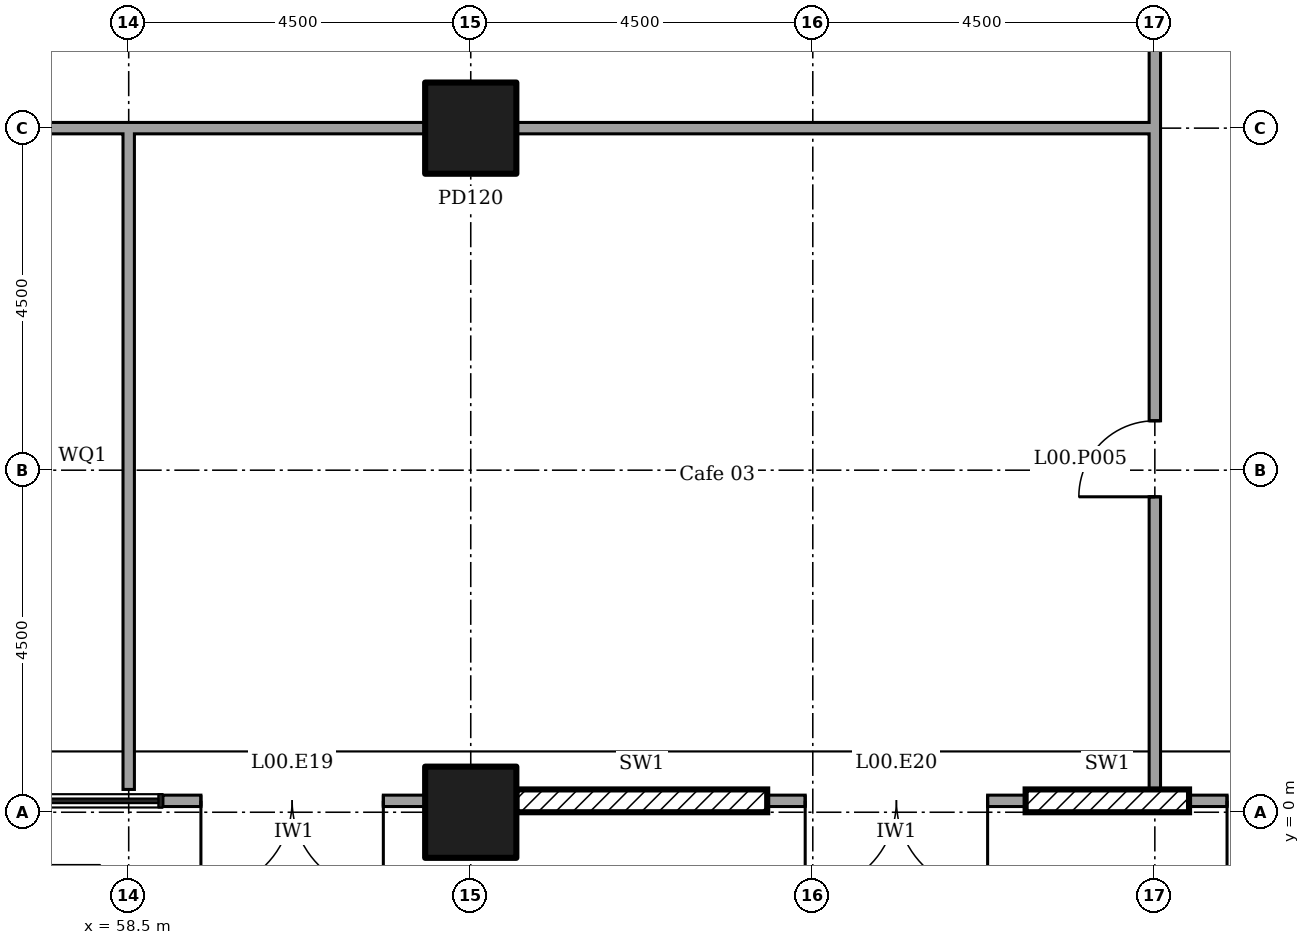
"""IFC4 building model, lengths in metres.
Left out: names, types, materials, properties, quantities, classifications, styles, units other than length and angle.
Written with IfcOpenShell. Run it as: python <this file> out.ifc"""

import sys

from ifc_helpers import new_model, si_unit, direction, frame, frame_2d, origin, origin_2d, place, context, subcontext, project, spatial, rectangle, extrude, element, fill, save


model = new_model("IFC4")
c1 = context("Model", 3, precision=1e-05, world=origin(), true_north=direction((0.0, 1.0)))
c2 = subcontext(c1, "Body", "Model", "MODEL_VIEW")
j1 = project(units=[si_unit("LENGTHUNIT", "METRE"), si_unit("PLANEANGLEUNIT", "RADIAN")], contexts=[c1])
p1 = place(None, origin())
s1 = spatial("IfcSite", under=j1, at=p1, CompositionType="ELEMENT")
p2 = place(p1, origin())
s2 = spatial("IfcBuilding", under=s1, at=p2, CompositionType="ELEMENT")
p3 = place(p2, origin())
s3 = spatial("IfcBuildingStorey", under=s2, at=p3, CompositionType="ELEMENT", Elevation=0.0)
for number, where in (
    (1, (63.0, 0.0, 0.0)),
    (2, (63.0, 9.0, 0.0)),
):
    element("IfcColumn", number, at=place(p3, frame(where)), inside=s3, PredefinedType="COLUMN", context=c2, shape_type="SweptSolid", body=[
        extrude(rectangle(XDim=1.2, YDim=1.2, at=origin_2d()), origin(), (0.0, 0.0, 1.0), 6.0),
    ])
p4 = place(p3, frame((58.95, 0.15, 0.0)))
e3 = element("IfcWall", 3, at=p4, inside=s3, PredefinedType="SOLIDWALL", context=c2, shape_type="SweptSolid", body=[
    extrude(rectangle(XDim=3.45, YDim=0.15, at=frame_2d((1.725, 0.0))), origin(), (0.0, 0.0, 1.0), 5.55),
])
p5 = place(p4, frame((0.5, 0.0, 0.0)))
e4 = element("IfcOpeningElement", 4, at=p5, cuts=e3, PredefinedType="OPENING", context=c2, shape_type="SweptSolid", body=[
    extrude(rectangle(XDim=2.4, YDim=2.7, at=frame_2d((1.2, 1.35))), frame((0.0, 0.085, 0.0), z_axis=(0.0, -1.0, 0.0), x_axis=(1.0, 0.0, 0.0)), (0.0, 0.0, 1.0), 0.17),
])
p6 = place(p3, frame((63.6, 0.15, 0.0)))
e5 = element("IfcWall", 5, at=p6, inside=s3, PredefinedType="ELEMENTEDWALL", context=c2, shape_type="SweptSolid", body=[
    extrude(rectangle(XDim=3.3, YDim=0.3, at=frame_2d((1.65, 0.0))), origin(), (0.0, 0.0, 1.0), 5.55),
])
p7 = place(p3, frame((66.9, 0.15, 0.0)))
e6 = element("IfcWall", 6, at=p7, inside=s3, PredefinedType="SOLIDWALL", context=c2, shape_type="SweptSolid", body=[
    extrude(rectangle(XDim=3.4, YDim=0.15, at=frame_2d((1.7, 0.0))), origin(), (0.0, 0.0, 1.0), 5.55),
])
p8 = place(p7, frame((0.5, 0.0, 0.0)))
e7 = element("IfcOpeningElement", 7, at=p8, cuts=e6, PredefinedType="OPENING", context=c2, shape_type="SweptSolid", body=[
    extrude(rectangle(XDim=2.4, YDim=2.7, at=frame_2d((1.2, 1.35))), frame((0.0, 0.085, 0.0), z_axis=(0.0, -1.0, 0.0), x_axis=(1.0, 0.0, 0.0)), (0.0, 0.0, 1.0), 0.17),
])
p9 = place(p3, frame((70.3, 0.15, 0.0)))
e8 = element("IfcWall", 8, at=p9, inside=s3, PredefinedType="ELEMENTEDWALL", context=c2, shape_type="SweptSolid", body=[
    extrude(rectangle(XDim=2.15, YDim=0.3, at=frame_2d((1.075, 0.0))), origin(), (0.0, 0.0, 1.0), 5.55),
])
p10 = place(p3, frame((72.45, 0.15, 0.0)))
e9 = element("IfcWall", 9, at=p10, inside=s3, PredefinedType="SOLIDWALL", context=c2, shape_type="SweptSolid", body=[
    extrude(rectangle(XDim=3.45, YDim=0.15, at=frame_2d((1.725, 0.0))), origin(), (0.0, 0.0, 1.0), 5.55),
])
p11 = place(p10, frame((0.5, 0.0, 0.0)))
e10 = element("IfcOpeningElement", 10, at=p11, cuts=e9, PredefinedType="OPENING", context=c2, shape_type="SweptSolid", body=[
    extrude(rectangle(XDim=2.4, YDim=2.7, at=frame_2d((1.2, 1.35))), frame((0.0, 0.085, 0.0), z_axis=(0.0, -1.0, 0.0), x_axis=(1.0, 0.0, 0.0)), (0.0, 0.0, 1.0), 0.17),
])
p12 = place(p3, frame((72.0, 0.3, 0.0), z_axis=(0.0, 0.0, 1.0), x_axis=(0.0, 1.0, 0.0)))
e11 = element("IfcWall", 11, at=p12, inside=s3, PredefinedType="PARTITIONING", context=c2, shape_type="SweptSolid", body=[
    extrude(rectangle(XDim=8.775, YDim=0.15, at=frame_2d((4.387, 0.0))), origin(), (0.0, 0.0, 1.0), 5.55),
])
p13 = place(p12, frame((3.85, 0.0, 0.0)))
e12 = element("IfcOpeningElement", 12, at=p13, cuts=e11, PredefinedType="OPENING", context=c2, shape_type="SweptSolid", body=[
    extrude(rectangle(XDim=1.0, YDim=2.1, at=frame_2d((0.5, 1.05))), frame((0.0, 0.085, 0.0), z_axis=(0.0, -1.0, 0.0), x_axis=(1.0, 0.0, 0.0)), (0.0, 0.0, 1.0), 0.17),
])
p14 = place(p3, frame((72.0, 9.0, 0.0), z_axis=(0.0, 0.0, 1.0), x_axis=(0.0, 1.0, 0.0)))
e13 = element("IfcWall", 13, at=p14, inside=s3, PredefinedType="PARTITIONING", context=c2, shape_type="SweptSolid", body=[
    extrude(rectangle(XDim=9.075, YDim=0.15, at=frame_2d((4.538, 0.0))), origin(), (0.0, 0.0, 1.0), 5.55),
])
p15 = place(p14, frame((3.6, 0.0, 0.0)))
e14 = element("IfcOpeningElement", 14, at=p15, cuts=e13, PredefinedType="OPENING", context=c2, shape_type="SweptSolid", body=[
    extrude(rectangle(XDim=1.8, YDim=2.1, at=frame_2d((0.9, 1.05))), frame((0.0, 0.085, 0.0), z_axis=(0.0, -1.0, 0.0), x_axis=(1.0, 0.0, 0.0)), (0.0, 0.0, 1.0), 0.17),
])
p16 = place(p3, frame((58.5, 0.3, 0.0), z_axis=(0.0, 0.0, 1.0), x_axis=(0.0, 1.0, 0.0)))
e15 = element("IfcWall", 15, at=p16, inside=s3, PredefinedType="PARTITIONING", context=c2, shape_type="SweptSolid", body=[
    extrude(rectangle(XDim=8.775, YDim=0.15, at=frame_2d((4.387, 0.0))), origin(), (0.0, 0.0, 1.0), 5.55),
])
p17 = place(p3, frame((50.095, 9.0, 0.0)))
e16 = element("IfcWall", 16, at=p17, inside=s3, PredefinedType="PARTITIONING", context=c2, shape_type="SweptSolid", body=[
    extrude(rectangle(XDim=8.405, YDim=0.15, at=frame_2d((4.203, 0.0))), origin(), (0.0, 0.0, 1.0), 5.55),
])
p18 = place(p17, frame((3.7, 0.0, 0.0)))
e17 = element("IfcOpeningElement", 17, at=p18, cuts=e16, PredefinedType="OPENING", context=c2, shape_type="SweptSolid", body=[
    extrude(rectangle(XDim=1.0, YDim=2.1, at=frame_2d((0.5, 1.05))), frame((0.0, 0.085, 0.0), z_axis=(0.0, -1.0, 0.0), x_axis=(1.0, 0.0, 0.0)), (0.0, 0.0, 1.0), 0.17),
])
p19 = place(p3, frame((58.575, 9.0, 0.0)))
e18 = element("IfcWall", 18, at=p19, inside=s3, PredefinedType="PARTITIONING", context=c2, shape_type="SweptSolid", body=[
    extrude(rectangle(XDim=3.83, YDim=0.15, at=frame_2d((1.915, 0.0))), origin(), (0.0, 0.0, 1.0), 5.55),
])
p20 = place(p3, frame((63.595, 9.0, 0.0)))
e19 = element("IfcWall", 19, at=p20, inside=s3, PredefinedType="PARTITIONING", context=c2, shape_type="SweptSolid", body=[
    extrude(rectangle(XDim=8.33, YDim=0.15, at=frame_2d((4.165, 0.0))), origin(), (0.0, 0.0, 1.0), 5.55),
])
p21 = place(p5, frame((2.4, 0.0, 0.0), x_axis=(-1.0, 0.0, 0.0)))
e20 = element("IfcDoor", 20, at=p21, inside=s3, OperationType="DOUBLE_DOOR_DOUBLE_SWING", PredefinedType="NOTDEFINED", context=c2, shape_type="SweptSolid", body=[
    extrude(rectangle(XDim=2.4, YDim=2.7, at=frame_2d((1.2, 1.35))), frame((0.0, 0.025, 0.0), z_axis=(0.0, -1.0, 0.0), x_axis=(1.0, 0.0, 0.0)), (0.0, 0.0, 1.0), 0.05),
])
fill(e4, e20)
p22 = place(p8, frame((2.4, 0.0, 0.0), x_axis=(-1.0, 0.0, 0.0)))
e21 = element("IfcDoor", 21, at=p22, inside=s3, OperationType="DOUBLE_DOOR_DOUBLE_SWING", PredefinedType="NOTDEFINED", context=c2, shape_type="SweptSolid", body=[
    extrude(rectangle(XDim=2.4, YDim=2.7, at=frame_2d((1.2, 1.35))), frame((0.0, 0.025, 0.0), z_axis=(0.0, -1.0, 0.0), x_axis=(1.0, 0.0, 0.0)), (0.0, 0.0, 1.0), 0.05),
])
fill(e7, e21)
p23 = place(p11, frame((2.4, 0.0, 0.0), x_axis=(-1.0, 0.0, 0.0)))
e22 = element("IfcDoor", 22, at=p23, inside=s3, OperationType="DOUBLE_DOOR_DOUBLE_SWING", PredefinedType="NOTDEFINED", context=c2, shape_type="SweptSolid", body=[
    extrude(rectangle(XDim=2.4, YDim=2.7, at=frame_2d((1.2, 1.35))), frame((0.0, 0.025, 0.0), z_axis=(0.0, -1.0, 0.0), x_axis=(1.0, 0.0, 0.0)), (0.0, 0.0, 1.0), 0.05),
])
fill(e10, e22)
p24 = place(p13, origin())
e23 = element("IfcDoor", 23, at=p24, inside=s3, OperationType="SINGLE_SWING_RIGHT", PredefinedType="DOOR", context=c2, shape_type="SweptSolid", body=[
    extrude(rectangle(XDim=1.0, YDim=2.1, at=frame_2d((0.5, 1.05))), frame((0.0, 0.025, 0.0), z_axis=(0.0, -1.0, 0.0), x_axis=(1.0, 0.0, 0.0)), (0.0, 0.0, 1.0), 0.05),
])
fill(e12, e23)
save(model, sys.argv[1])
